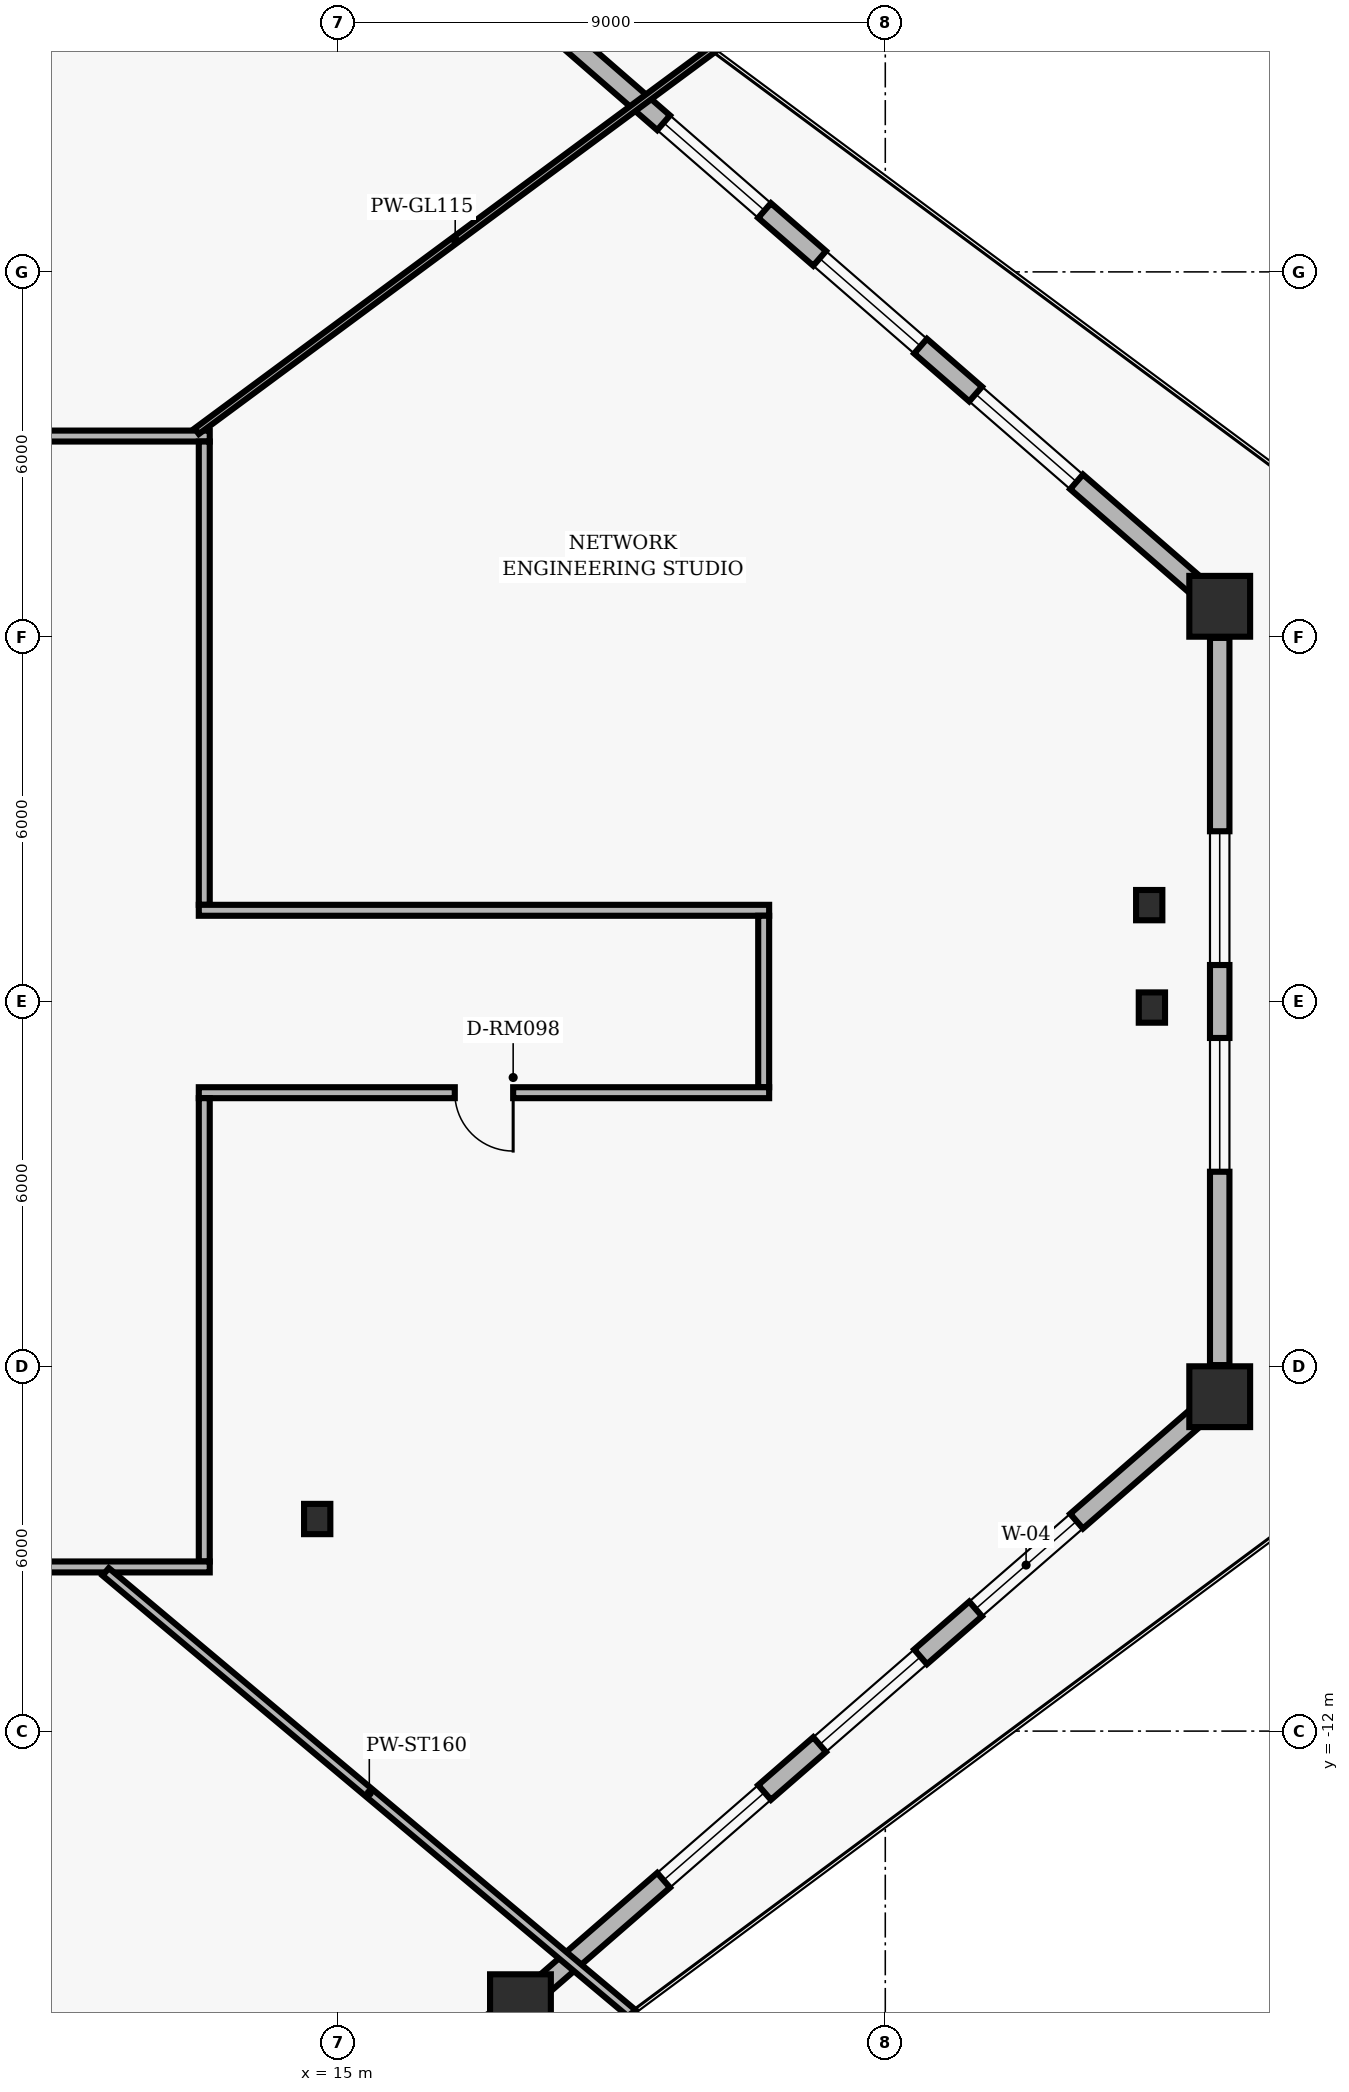
"""IFC4 building model, lengths in metres.
Left out: names, types, materials, properties, quantities, classifications, styles, units other than length and angle.
Written with IfcOpenShell. Run it as: python <this file> out.ifc"""

import sys

from ifc_helpers import new_model, si_unit, direction, frame, frame_2d, origin, origin_2d, place, context, subcontext, project, spatial, rectangle, i_section, extrude, element, fill, save


model = new_model("IFC4")
c1 = context("Model", 3, precision=1e-05, world=origin(), true_north=direction((0.0, 1.0)))
c2 = subcontext(c1, "Body", "Model", "MODEL_VIEW")
j1 = project(units=[si_unit("LENGTHUNIT", "METRE"), si_unit("PLANEANGLEUNIT", "RADIAN")], contexts=[c1])
p1 = place(None, origin())
s1 = spatial("IfcSite", under=j1, at=p1, CompositionType="ELEMENT")
p2 = place(p1, origin())
s2 = spatial("IfcBuilding", under=s1, at=p2, CompositionType="ELEMENT")
p3 = place(p2, frame((0.0, 0.0, 11.84)))
s3 = spatial("IfcBuildingStorey", under=s2, at=p3, CompositionType="ELEMENT", Elevation=11.84)
for number, where, z_axis, x_axis in (
    (1, (18.0, -16.5, 0.0), (0.0, 0.0, 1.0), (1.0, 0.0, 0.0)),
    (2, (29.5, -6.5, 0.0), (0.0, 0.0, 1.0), (1.0, 0.0, 0.0)),
    (3, (29.5, 6.5, 0.0), (0.0, 0.0, 1.0), (1.0, 0.0, 0.0)),
):
    element("IfcColumn", number, at=place(p3, frame(where, z_axis=z_axis, x_axis=x_axis)), inside=s3, PredefinedType="COLUMN", context=c2, shape_type="SweptSolid", body=[
        extrude(rectangle(XDim=1.0, YDim=1.0, at=origin_2d()), origin(), (0.0, 0.0, 1.0), 3.52),
    ])
for number, where, z_axis, x_axis in (
    (4, (28.341, 1.585, 0.0), (0.0, 0.0, 1.0), (1.0, 0.0, 0.0)),
    (5, (14.657, -8.512, 0.0), (0.0, 0.0, 1.0), (1.0, 0.0, 0.0)),
    (6, (28.385, -0.1, 0.0), (0.0, 0.0, 1.0), (1.0, 0.0, 0.0)),
):
    element("IfcColumn", number, at=place(p3, frame(where, z_axis=z_axis, x_axis=x_axis)), inside=s3, PredefinedType="COLUMN", context=c2, shape_type="SweptSolid", body=[
        extrude(i_section(OverallWidth=0.432, OverallDepth=0.498, WebThickness=0.056, FlangeThickness=0.089, FilletRadius=0.025, at=origin_2d()), origin(), (0.0, 0.0, 1.0), 3.52),
    ])
p4 = place(p3, frame((29.108, -6.841, 0.0), z_axis=(0.0, 0.0, 1.0), x_axis=(-0.754615886195, -0.656166796098, 0.0)))
e7 = element("IfcWall", 7, at=p4, inside=s3, PredefinedType="SOLIDWALL", context=c2, shape_type="SweptSolid", body=[
    extrude(rectangle(XDim=14.2, YDim=0.32, at=frame_2d((7.1, 0.0))), origin(), (0.0, 0.0, 1.0), 2.221),
])
p5 = place(p4, frame((2.6, 0.0, 0.4)))
e8 = element("IfcOpeningElement", 8, at=p5, cuts=e7, PredefinedType="OPENING", context=c2, shape_type="SweptSolid", body=[
    extrude(rectangle(XDim=2.2, YDim=1.1, at=frame_2d((1.1, 0.55))), frame((0.0, 0.17, 0.0), z_axis=(0.0, -1.0, 0.0), x_axis=(1.0, 0.0, 0.0)), (0.0, 0.0, 1.0), 0.34),
])
p6 = place(p4, frame((6.0, 0.0, 0.4)))
e9 = element("IfcOpeningElement", 9, at=p6, cuts=e7, PredefinedType="OPENING", context=c2, shape_type="SweptSolid", body=[
    extrude(rectangle(XDim=2.2, YDim=1.1, at=frame_2d((1.1, 0.55))), frame((0.0, 0.17, 0.0), z_axis=(0.0, -1.0, 0.0), x_axis=(1.0, 0.0, 0.0)), (0.0, 0.0, 1.0), 0.34),
])
p7 = place(p4, frame((9.4, 0.0, 0.4)))
e10 = element("IfcOpeningElement", 10, at=p7, cuts=e7, PredefinedType="OPENING", context=c2, shape_type="SweptSolid", body=[
    extrude(rectangle(XDim=2.2, YDim=1.1, at=frame_2d((1.1, 0.55))), frame((0.0, 0.17, 0.0), z_axis=(0.0, -1.0, 0.0), x_axis=(1.0, 0.0, 0.0)), (0.0, 0.0, 1.0), 0.34),
])
p8 = place(p3, frame((29.5, 5.98, 0.0), z_axis=(0.0, 0.0, 1.0), x_axis=(0.0, -1.0, 0.0)))
e11 = element("IfcWall", 11, at=p8, inside=s3, PredefinedType="SOLIDWALL", context=c2, shape_type="SweptSolid", body=[
    extrude(rectangle(XDim=11.96, YDim=0.32, at=frame_2d((5.98, 0.0))), origin(), (0.0, 0.0, 1.0), 2.548),
])
p9 = place(p8, frame((3.18, 0.0, 0.65)))
e12 = element("IfcOpeningElement", 12, at=p9, cuts=e11, PredefinedType="OPENING", context=c2, shape_type="SweptSolid", body=[
    extrude(rectangle(XDim=2.2, YDim=1.1, at=frame_2d((1.1, 0.55))), frame((0.0, 0.17, 0.0), z_axis=(0.0, -1.0, 0.0), x_axis=(1.0, 0.0, 0.0)), (0.0, 0.0, 1.0), 0.34),
])
p10 = place(p8, frame((6.58, 0.0, 0.65)))
e13 = element("IfcOpeningElement", 13, at=p10, cuts=e11, PredefinedType="OPENING", context=c2, shape_type="SweptSolid", body=[
    extrude(rectangle(XDim=2.2, YDim=1.1, at=frame_2d((1.1, 0.55))), frame((0.0, 0.17, 0.0), z_axis=(0.0, -1.0, 0.0), x_axis=(1.0, 0.0, 0.0)), (0.0, 0.0, 1.0), 0.34),
])
p11 = place(p3, frame((18.392, 16.159, 0.0), z_axis=(0.0, 0.0, 1.0), x_axis=(0.754615886195, -0.656166796098, 0.0)))
e14 = element("IfcWall", 14, at=p11, inside=s3, PredefinedType="SOLIDWALL", context=c2, shape_type="SweptSolid", body=[
    extrude(rectangle(XDim=14.2, YDim=0.32, at=frame_2d((7.1, 0.0))), origin(), (0.0, 0.0, 1.0), 2.221),
])
p12 = place(p11, frame((2.6, 0.0, 0.4)))
e15 = element("IfcOpeningElement", 15, at=p12, cuts=e14, PredefinedType="OPENING", context=c2, shape_type="SweptSolid", body=[
    extrude(rectangle(XDim=2.2, YDim=1.1, at=frame_2d((1.1, 0.55))), frame((0.0, 0.17, 0.0), z_axis=(0.0, -1.0, 0.0), x_axis=(1.0, 0.0, 0.0)), (0.0, 0.0, 1.0), 0.34),
])
p13 = place(p11, frame((6.0, 0.0, 0.4)))
e16 = element("IfcOpeningElement", 16, at=p13, cuts=e14, PredefinedType="OPENING", context=c2, shape_type="SweptSolid", body=[
    extrude(rectangle(XDim=2.2, YDim=1.1, at=frame_2d((1.1, 0.55))), frame((0.0, 0.17, 0.0), z_axis=(0.0, -1.0, 0.0), x_axis=(1.0, 0.0, 0.0)), (0.0, 0.0, 1.0), 0.34),
])
p14 = place(p11, frame((9.4, 0.0, 0.4)))
e17 = element("IfcOpeningElement", 17, at=p14, cuts=e14, PredefinedType="OPENING", context=c2, shape_type="SweptSolid", body=[
    extrude(rectangle(XDim=2.2, YDim=1.1, at=frame_2d((1.1, 0.55))), frame((0.0, 0.17, 0.0), z_axis=(0.0, -1.0, 0.0), x_axis=(1.0, 0.0, 0.0)), (0.0, 0.0, 1.0), 0.34),
])
p15 = place(p3, frame((-12.89, 9.3, 0.0), z_axis=(0.0, 0.0, 1.0), x_axis=(1.0, 0.0, 0.0)))
e18 = element("IfcWall", 18, at=p15, inside=s3, PredefinedType="PARTITIONING", context=c2, shape_type="SweptSolid", body=[
    extrude(rectangle(XDim=25.78, YDim=0.18, at=frame_2d((12.89, 0.0))), origin(), (0.0, 0.0, 1.0), 2.72),
])
p16 = place(p15, frame((17.202, 0.0, 0.0)))
e19 = element("IfcOpeningElement", 19, at=p16, cuts=e18, PredefinedType="OPENING", context=c2, shape_type="SweptSolid", body=[
    extrude(rectangle(XDim=0.96, YDim=2.02, at=frame_2d((0.48, 1.01))), frame((0.0, 0.1, 0.0), z_axis=(0.0, -1.0, 0.0), x_axis=(1.0, 0.0, 0.0)), (0.0, 0.0, 1.0), 0.2),
])
p17 = place(p15, frame((4.539, 0.0, 0.0)))
e20 = element("IfcOpeningElement", 20, at=p17, cuts=e18, PredefinedType="OPENING", context=c2, shape_type="SweptSolid", body=[
    extrude(rectangle(XDim=1.02, YDim=2.02, at=frame_2d((0.51, 1.01))), frame((0.0, 0.1, 0.0), z_axis=(0.0, -1.0, 0.0), x_axis=(1.0, 0.0, 0.0)), (0.0, 0.0, 1.0), 0.2),
])
p18 = place(p3, frame((12.8, 9.21, 0.0), z_axis=(0.0, 0.0, 1.0), x_axis=(0.0, -1.0, 0.0)))
e21 = element("IfcWall", 21, at=p18, inside=s3, PredefinedType="PARTITIONING", context=c2, shape_type="SweptSolid", body=[
    extrude(rectangle(XDim=7.62, YDim=0.18, at=frame_2d((3.81, 0.0))), origin(), (0.0, 0.0, 1.0), 3.153),
])
p19 = place(p3, frame((12.71, 1.5, 0.0), z_axis=(0.0, 0.0, 1.0), x_axis=(1.0, 0.0, 0.0)))
e22 = element("IfcWall", 22, at=p19, inside=s3, PredefinedType="PARTITIONING", context=c2, shape_type="SweptSolid", body=[
    extrude(rectangle(XDim=9.38, YDim=0.18, at=frame_2d((4.69, 0.0))), origin(), (0.0, 0.0, 1.0), 3.153),
])
p20 = place(p3, frame((22.0, 1.41, 0.0), z_axis=(0.0, 0.0, 1.0), x_axis=(0.0, -1.0, 0.0)))
e23 = element("IfcWall", 23, at=p20, inside=s3, PredefinedType="PARTITIONING", context=c2, shape_type="SweptSolid", body=[
    extrude(rectangle(XDim=2.82, YDim=0.18, at=frame_2d((1.41, 0.0))), origin(), (0.0, 0.0, 1.0), 3.153),
])
p21 = place(p3, frame((22.09, -1.5, 0.0), z_axis=(0.0, 0.0, 1.0), x_axis=(-1.0, 0.0, 0.0)))
e24 = element("IfcWall", 24, at=p21, inside=s3, PredefinedType="PARTITIONING", context=c2, shape_type="SweptSolid", body=[
    extrude(rectangle(XDim=9.38, YDim=0.18, at=frame_2d((4.69, 0.0))), origin(), (0.0, 0.0, 1.0), 3.153),
])
p22 = place(p21, frame((4.21, 0.0, 0.0)))
e25 = element("IfcOpeningElement", 25, at=p22, cuts=e24, PredefinedType="OPENING", context=c2, shape_type="SweptSolid", body=[
    extrude(rectangle(XDim=0.96, YDim=2.02, at=frame_2d((0.48, 1.01))), frame((0.0, 0.1, 0.0), z_axis=(0.0, -1.0, 0.0), x_axis=(1.0, 0.0, 0.0)), (0.0, 0.0, 1.0), 0.2),
])
p23 = place(p3, frame((12.8, -1.59, 0.0), z_axis=(0.0, 0.0, 1.0), x_axis=(0.0, -1.0, 0.0)))
e26 = element("IfcWall", 26, at=p23, inside=s3, PredefinedType="PARTITIONING", context=c2, shape_type="SweptSolid", body=[
    extrude(rectangle(XDim=7.62, YDim=0.18, at=frame_2d((3.81, 0.0))), origin(), (0.0, 0.0, 1.0), 3.153),
])
p24 = place(p3, frame((12.89, -9.3, 0.0), z_axis=(0.0, 0.0, 1.0), x_axis=(-1.0, 0.0, 0.0)))
e27 = element("IfcWall", 27, at=p24, inside=s3, PredefinedType="PARTITIONING", context=c2, shape_type="SweptSolid", body=[
    extrude(rectangle(XDim=25.78, YDim=0.18, at=frame_2d((12.89, 0.0))), origin(), (0.0, 0.0, 1.0), 2.72),
])
p25 = place(p24, frame((9.254, 0.0, 0.0)))
e28 = element("IfcOpeningElement", 28, at=p25, cuts=e27, PredefinedType="OPENING", context=c2, shape_type="SweptSolid", body=[
    extrude(rectangle(XDim=1.02, YDim=2.02, at=frame_2d((0.51, 1.01))), frame((0.0, 0.1, 0.0), z_axis=(0.0, -1.0, 0.0), x_axis=(1.0, 0.0, 0.0)), (0.0, 0.0, 1.0), 0.2),
])
p26 = place(p3, frame((11.179, -9.38, 0.0), z_axis=(0.0, 0.0, 1.0), x_axis=(0.766037025887, -0.642796449095, 0.0)))
e29 = element("IfcWall", 29, at=p26, inside=s3, PredefinedType="PARTITIONING", context=c2, shape_type="SweptSolid", body=[
    extrude(rectangle(XDim=11.32, YDim=0.16, at=frame_2d((5.66, 0.0))), origin(), (0.0, 0.0, 1.0), 2.206),
])
p27 = place(p3, frame((12.676, 9.38, 0.0), z_axis=(0.0, 0.0, 1.0), x_axis=(0.803850730109, 0.594831071568, 0.0)))
e30 = element("IfcWall", 30, at=p27, inside=s3, PredefinedType="MOVABLE", context=c2, shape_type="SweptSolid", body=[
    extrude(rectangle(XDim=10.575, YDim=0.115, at=frame_2d((5.288, 0.0))), origin(), (0.0, 0.0, 1.0), 2.206),
])
p28 = place(p5, origin())
e31 = element("IfcWindow", 31, at=p28, inside=s3, PartitioningType="SINGLE_PANEL", PredefinedType="WINDOW", context=c2, shape_type="SweptSolid", body=[
    extrude(rectangle(XDim=2.2, YDim=1.1, at=frame_2d((1.1, 0.55))), frame((0.0, 0.03, 0.0), z_axis=(0.0, -1.0, 0.0), x_axis=(1.0, 0.0, 0.0)), (0.0, 0.0, 1.0), 0.06),
])
fill(e8, e31)
p29 = place(p6, origin())
e32 = element("IfcWindow", 32, at=p29, inside=s3, PartitioningType="SINGLE_PANEL", PredefinedType="WINDOW", context=c2, shape_type="SweptSolid", body=[
    extrude(rectangle(XDim=2.2, YDim=1.1, at=frame_2d((1.1, 0.55))), frame((0.0, 0.03, 0.0), z_axis=(0.0, -1.0, 0.0), x_axis=(1.0, 0.0, 0.0)), (0.0, 0.0, 1.0), 0.06),
])
fill(e9, e32)
p30 = place(p7, origin())
e33 = element("IfcWindow", 33, at=p30, inside=s3, PartitioningType="SINGLE_PANEL", PredefinedType="WINDOW", context=c2, shape_type="SweptSolid", body=[
    extrude(rectangle(XDim=2.2, YDim=1.1, at=frame_2d((1.1, 0.55))), frame((0.0, 0.03, 0.0), z_axis=(0.0, -1.0, 0.0), x_axis=(1.0, 0.0, 0.0)), (0.0, 0.0, 1.0), 0.06),
])
fill(e10, e33)
p31 = place(p9, origin())
e34 = element("IfcWindow", 34, at=p31, inside=s3, PartitioningType="SINGLE_PANEL", PredefinedType="WINDOW", context=c2, shape_type="SweptSolid", body=[
    extrude(rectangle(XDim=2.2, YDim=1.1, at=frame_2d((1.1, 0.55))), frame((0.0, 0.03, 0.0), z_axis=(0.0, -1.0, 0.0), x_axis=(1.0, 0.0, 0.0)), (0.0, 0.0, 1.0), 0.06),
])
fill(e12, e34)
p32 = place(p10, origin())
e35 = element("IfcWindow", 35, at=p32, inside=s3, PartitioningType="SINGLE_PANEL", PredefinedType="WINDOW", context=c2, shape_type="SweptSolid", body=[
    extrude(rectangle(XDim=2.2, YDim=1.1, at=frame_2d((1.1, 0.55))), frame((0.0, 0.03, 0.0), z_axis=(0.0, -1.0, 0.0), x_axis=(1.0, 0.0, 0.0)), (0.0, 0.0, 1.0), 0.06),
])
fill(e13, e35)
p33 = place(p12, origin())
e36 = element("IfcWindow", 36, at=p33, inside=s3, PartitioningType="SINGLE_PANEL", PredefinedType="WINDOW", context=c2, shape_type="SweptSolid", body=[
    extrude(rectangle(XDim=2.2, YDim=1.1, at=frame_2d((1.1, 0.55))), frame((0.0, 0.03, 0.0), z_axis=(0.0, -1.0, 0.0), x_axis=(1.0, 0.0, 0.0)), (0.0, 0.0, 1.0), 0.06),
])
fill(e15, e36)
p34 = place(p13, origin())
e37 = element("IfcWindow", 37, at=p34, inside=s3, PartitioningType="SINGLE_PANEL", PredefinedType="WINDOW", context=c2, shape_type="SweptSolid", body=[
    extrude(rectangle(XDim=2.2, YDim=1.1, at=frame_2d((1.1, 0.55))), frame((0.0, 0.03, 0.0), z_axis=(0.0, -1.0, 0.0), x_axis=(1.0, 0.0, 0.0)), (0.0, 0.0, 1.0), 0.06),
])
fill(e16, e37)
p35 = place(p14, origin())
e38 = element("IfcWindow", 38, at=p35, inside=s3, PartitioningType="SINGLE_PANEL", PredefinedType="WINDOW", context=c2, shape_type="SweptSolid", body=[
    extrude(rectangle(XDim=2.2, YDim=1.1, at=frame_2d((1.1, 0.55))), frame((0.0, 0.03, 0.0), z_axis=(0.0, -1.0, 0.0), x_axis=(1.0, 0.0, 0.0)), (0.0, 0.0, 1.0), 0.06),
])
fill(e17, e38)
p36 = place(p22, origin())
e39 = element("IfcDoor", 39, at=p36, inside=s3, OperationType="SINGLE_SWING_LEFT", PredefinedType="DOOR", context=c2, shape_type="SweptSolid", body=[
    extrude(rectangle(XDim=0.96, YDim=2.02, at=frame_2d((0.48, 1.01))), frame((0.0, 0.025, 0.0), z_axis=(0.0, -1.0, 0.0), x_axis=(1.0, 0.0, 0.0)), (0.0, 0.0, 1.0), 0.05),
])
fill(e25, e39)
save(model, sys.argv[1])
